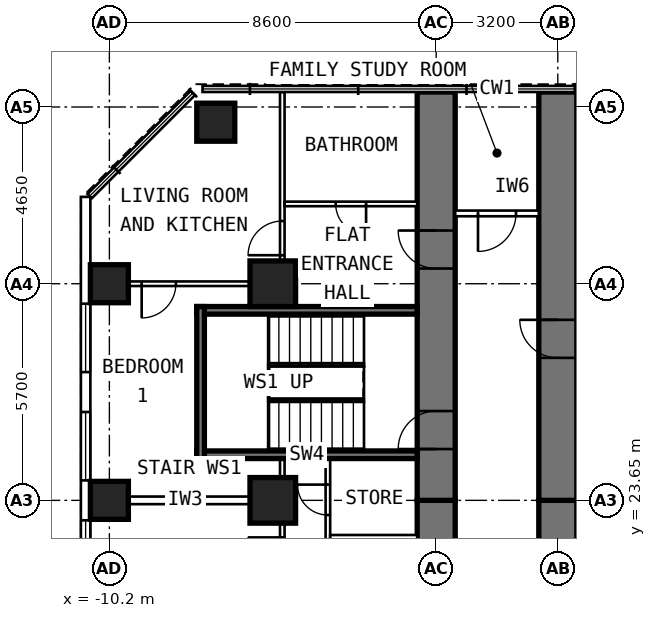
"""IFC4 building model, lengths in metres.
Left out: names, types, materials, properties, quantities, classifications, styles, units other than length and angle.
Written with IfcOpenShell. Run it as: python <this file> out.ifc"""

import sys

from ifc_helpers import new_model, si_unit, direction, frame, frame_2d, origin, origin_2d, place, context, subcontext, project, spatial, rectangle, extrude, element, fill, save


model = new_model("IFC4")
c1 = context("Model", 3, precision=1e-05, world=origin(), true_north=direction((0.0, 1.0)))
c2 = subcontext(c1, "Body", "Model", "MODEL_VIEW")
j1 = project(units=[si_unit("LENGTHUNIT", "METRE"), si_unit("PLANEANGLEUNIT", "RADIAN")], contexts=[c1])
p1 = place(None, origin())
s1 = spatial("IfcSite", under=j1, at=p1, CompositionType="ELEMENT")
p2 = place(p1, origin())
s2 = spatial("IfcBuilding", under=s1, at=p2, CompositionType="ELEMENT")
p3 = place(p2, frame((0.0, 0.0, 68.2)))
s3 = spatial("IfcBuildingStorey", under=s2, at=p3, CompositionType="ELEMENT", Elevation=68.2)
for number, where, z_axis, x_axis in (
    (1, (-10.2, 23.65, 0.0), (0.0, 0.0, 1.0), (0.0, 1.0, 0.0)),
    (2, (-10.2, 29.35, 0.0), (0.0, 0.0, 1.0), (0.0, 1.0, 0.0)),
    (3, (-7.4, 33.6, 0.0), (0.0, 0.0, 1.0), (0.0, 1.0, 0.0)),
):
    element("IfcColumn", number, at=place(p3, frame(where, z_axis=z_axis, x_axis=x_axis)), inside=s3, PredefinedType="COLUMN", context=c2, shape_type="SweptSolid", body=[
        extrude(rectangle(XDim=1.0, YDim=1.0, at=origin_2d()), origin(), (0.0, 0.0, 1.0), 3.6),
    ])
for number, where, z_axis, x_axis in (
    (4, (-5.9, 23.65, 0.0), (0.0, 0.0, 1.0), (0.0, 1.0, 0.0)),
    (5, (-5.9, 29.35, 0.0), (0.0, 0.0, 1.0), (0.0, 1.0, 0.0)),
):
    element("IfcColumn", number, at=place(p3, frame(where, z_axis=z_axis, x_axis=x_axis)), inside=s3, PredefinedType="COLUMN", context=c2, shape_type="SweptSolid", body=[
        extrude(rectangle(XDim=1.2, YDim=1.2, at=origin_2d()), origin(), (0.0, 0.0, 1.0), 3.6),
    ])
p4 = place(p3, frame((-1.6, 17.95, 0.0), z_axis=(0.0, 0.0, 1.0), x_axis=(0.0, 1.0, 0.0)))
e6 = element("IfcWall", 6, at=p4, inside=s3, PredefinedType="SHEAR", context=c2, shape_type="SweptSolid", body=[
    extrude(rectangle(XDim=5.7, YDim=1.0, at=frame_2d((2.85, 0.0))), origin(), (0.0, 0.0, 1.0), 3.6),
])
p5 = place(p3, frame((-1.6, 23.65, 0.0), z_axis=(0.0, 0.0, 1.0), x_axis=(0.0, 1.0, 0.0)))
e7 = element("IfcWall", 7, at=p5, inside=s3, PredefinedType="SHEAR", context=c2, shape_type="SweptSolid", body=[
    extrude(rectangle(XDim=10.745, YDim=1.0, at=frame_2d((5.373, 0.0))), origin(), (0.0, 0.0, 1.0), 3.6),
])
p6 = place(p5, frame((6.1, 0.0, 0.0)))
e8 = element("IfcOpeningElement", 8, at=p6, cuts=e7, PredefinedType="OPENING", context=c2, shape_type="SweptSolid", body=[
    extrude(rectangle(XDim=1.0, YDim=2.1, at=frame_2d((0.5, 1.05))), frame((0.0, 0.512, 0.0), z_axis=(0.0, -1.0, 0.0), x_axis=(1.0, 0.0, 0.0)), (0.0, 0.0, 1.0), 1.024),
])
p7 = place(p5, frame((1.35, 0.0, 0.0)))
e9 = element("IfcOpeningElement", 9, at=p7, cuts=e7, PredefinedType="OPENING", context=c2, shape_type="SweptSolid", body=[
    extrude(rectangle(XDim=1.0, YDim=2.1, at=frame_2d((0.5, 1.05))), frame((0.0, 0.512, 0.0), z_axis=(0.0, -1.0, 0.0), x_axis=(1.0, 0.0, 0.0)), (0.0, 0.0, 1.0), 1.024),
])
p8 = place(p3, frame((1.6, 17.95, 0.0), z_axis=(0.0, 0.0, 1.0), x_axis=(0.0, 1.0, 0.0)))
e10 = element("IfcWall", 10, at=p8, inside=s3, PredefinedType="SHEAR", context=c2, shape_type="SweptSolid", body=[
    extrude(rectangle(XDim=5.7, YDim=1.0, at=frame_2d((2.85, 0.0))), origin(), (0.0, 0.0, 1.0), 3.6),
])
p9 = place(p3, frame((1.6, 23.65, 0.0), z_axis=(0.0, 0.0, 1.0), x_axis=(0.0, 1.0, 0.0)))
e11 = element("IfcWall", 11, at=p9, inside=s3, PredefinedType="SHEAR", context=c2, shape_type="SweptSolid", body=[
    extrude(rectangle(XDim=10.745, YDim=1.0, at=frame_2d((5.373, 0.0))), origin(), (0.0, 0.0, 1.0), 3.6),
])
p10 = place(p9, frame((3.75, 0.0, 0.0)))
e12 = element("IfcOpeningElement", 12, at=p10, cuts=e11, PredefinedType="OPENING", context=c2, shape_type="SweptSolid", body=[
    extrude(rectangle(XDim=1.0, YDim=2.1, at=frame_2d((0.5, 1.05))), frame((0.0, 0.512, 0.0), z_axis=(0.0, -1.0, 0.0), x_axis=(1.0, 0.0, 0.0)), (0.0, 0.0, 1.0), 1.024),
])
p11 = place(p3, frame((-10.825, 6.148, 0.0), z_axis=(0.0, 0.0, 1.0), x_axis=(0.0, 1.0, 0.0)))
e13 = element("IfcWall", 13, at=p11, inside=s3, PredefinedType="SOLIDWALL", context=c2, shape_type="SweptSolid", body=[
    extrude(rectangle(XDim=25.487, YDim=0.25, at=frame_2d((12.744, 0.0))), origin(), (0.0, 0.0, 1.0), 3.35),
])
p12 = place(p11, frame((0.927, 0.0, 0.8)))
e14 = element("IfcOpeningElement", 14, at=p12, cuts=e13, PredefinedType="OPENING", context=c2, shape_type="SweptSolid", body=[
    extrude(rectangle(XDim=1.8, YDim=1.8, at=frame_2d((0.9, 0.9))), frame((0.0, 0.137, 0.0), z_axis=(0.0, -1.0, 0.0), x_axis=(1.0, 0.0, 0.0)), (0.0, 0.0, 1.0), 0.274),
])
p13 = place(p11, frame((3.777, 0.0, 0.8)))
e15 = element("IfcOpeningElement", 15, at=p13, cuts=e13, PredefinedType="OPENING", context=c2, shape_type="SweptSolid", body=[
    extrude(rectangle(XDim=1.8, YDim=1.8, at=frame_2d((0.9, 0.9))), frame((0.0, 0.137, 0.0), z_axis=(0.0, -1.0, 0.0), x_axis=(1.0, 0.0, 0.0)), (0.0, 0.0, 1.0), 0.274),
])
p14 = place(p11, frame((6.627, 0.0, 0.8)))
e16 = element("IfcOpeningElement", 16, at=p14, cuts=e13, PredefinedType="OPENING", context=c2, shape_type="SweptSolid", body=[
    extrude(rectangle(XDim=1.8, YDim=1.8, at=frame_2d((0.9, 0.9))), frame((0.0, 0.137, 0.0), z_axis=(0.0, -1.0, 0.0), x_axis=(1.0, 0.0, 0.0)), (0.0, 0.0, 1.0), 0.274),
])
p15 = place(p11, frame((9.477, 0.0, 0.8)))
e17 = element("IfcOpeningElement", 17, at=p15, cuts=e13, PredefinedType="OPENING", context=c2, shape_type="SweptSolid", body=[
    extrude(rectangle(XDim=1.8, YDim=1.8, at=frame_2d((0.9, 0.9))), frame((0.0, 0.137, 0.0), z_axis=(0.0, -1.0, 0.0), x_axis=(1.0, 0.0, 0.0)), (0.0, 0.0, 1.0), 0.274),
])
p16 = place(p11, frame((12.327, 0.0, 0.8)))
e18 = element("IfcOpeningElement", 18, at=p16, cuts=e13, PredefinedType="OPENING", context=c2, shape_type="SweptSolid", body=[
    extrude(rectangle(XDim=1.8, YDim=1.8, at=frame_2d((0.9, 0.9))), frame((0.0, 0.137, 0.0), z_axis=(0.0, -1.0, 0.0), x_axis=(1.0, 0.0, 0.0)), (0.0, 0.0, 1.0), 0.274),
])
p17 = place(p11, frame((15.177, 0.0, 0.8)))
e19 = element("IfcOpeningElement", 19, at=p17, cuts=e13, PredefinedType="OPENING", context=c2, shape_type="SweptSolid", body=[
    extrude(rectangle(XDim=1.8, YDim=1.8, at=frame_2d((0.9, 0.9))), frame((0.0, 0.137, 0.0), z_axis=(0.0, -1.0, 0.0), x_axis=(1.0, 0.0, 0.0)), (0.0, 0.0, 1.0), 0.274),
])
p18 = place(p11, frame((18.027, 0.0, 0.8)))
e20 = element("IfcOpeningElement", 20, at=p18, cuts=e13, PredefinedType="OPENING", context=c2, shape_type="SweptSolid", body=[
    extrude(rectangle(XDim=1.8, YDim=1.8, at=frame_2d((0.9, 0.9))), frame((0.0, 0.137, 0.0), z_axis=(0.0, -1.0, 0.0), x_axis=(1.0, 0.0, 0.0)), (0.0, 0.0, 1.0), 0.274),
])
p19 = place(p11, frame((20.877, 0.0, 0.8)))
e21 = element("IfcOpeningElement", 21, at=p19, cuts=e13, PredefinedType="OPENING", context=c2, shape_type="SweptSolid", body=[
    extrude(rectangle(XDim=1.8, YDim=1.8, at=frame_2d((0.9, 0.9))), frame((0.0, 0.137, 0.0), z_axis=(0.0, -1.0, 0.0), x_axis=(1.0, 0.0, 0.0)), (0.0, 0.0, 1.0), 0.274),
])
p20 = place(p3, frame((-4.45, 10.1, 0.0), z_axis=(0.0, 0.0, 1.0), x_axis=(0.0, 1.0, 0.0)))
e22 = element("IfcWall", 22, at=p20, inside=s3, PredefinedType="PARTITIONING", context=c2, shape_type="SweptSolid", body=[
    extrude(rectangle(XDim=14.65, YDim=0.12, at=frame_2d((7.325, 0.0))), origin(), (0.0, 0.0, 1.0), 3.35),
])
p21 = place(p20, frame((0.375, 0.0, 0.0)))
e23 = element("IfcOpeningElement", 23, at=p21, cuts=e22, PredefinedType="OPENING", context=c2, shape_type="SweptSolid", body=[
    extrude(rectangle(XDim=0.9, YDim=2.1, at=frame_2d((0.45, 1.05))), frame((0.0, 0.072, 0.0), z_axis=(0.0, -1.0, 0.0), x_axis=(1.0, 0.0, 0.0)), (0.0, 0.0, 1.0), 0.144),
])
p22 = place(p20, frame((2.275, 0.0, 0.0)))
e24 = element("IfcOpeningElement", 24, at=p22, cuts=e22, PredefinedType="OPENING", context=c2, shape_type="SweptSolid", body=[
    extrude(rectangle(XDim=0.8, YDim=2.1, at=frame_2d((0.4, 1.05))), frame((0.0, 0.072, 0.0), z_axis=(0.0, -1.0, 0.0), x_axis=(1.0, 0.0, 0.0)), (0.0, 0.0, 1.0), 0.144),
])
p23 = place(p20, frame((4.125, 0.0, 0.0)))
e25 = element("IfcOpeningElement", 25, at=p23, cuts=e22, PredefinedType="OPENING", context=c2, shape_type="SweptSolid", body=[
    extrude(rectangle(XDim=0.8, YDim=2.1, at=frame_2d((0.4, 1.05))), frame((0.0, 0.072, 0.0), z_axis=(0.0, -1.0, 0.0), x_axis=(1.0, 0.0, 0.0)), (0.0, 0.0, 1.0), 0.144),
])
p24 = place(p20, frame((6.1, 0.0, 0.0)))
e26 = element("IfcOpeningElement", 26, at=p24, cuts=e22, PredefinedType="OPENING", context=c2, shape_type="SweptSolid", body=[
    extrude(rectangle(XDim=0.9, YDim=2.1, at=frame_2d((0.45, 1.05))), frame((0.0, 0.072, 0.0), z_axis=(0.0, -1.0, 0.0), x_axis=(1.0, 0.0, 0.0)), (0.0, 0.0, 1.0), 0.144),
])
p25 = place(p20, frame((8.729, 0.0, 0.0)))
e27 = element("IfcOpeningElement", 27, at=p25, cuts=e22, PredefinedType="OPENING", context=c2, shape_type="SweptSolid", body=[
    extrude(rectangle(XDim=0.8, YDim=2.1, at=frame_2d((0.4, 1.05))), frame((0.0, 0.072, 0.0), z_axis=(0.0, -1.0, 0.0), x_axis=(1.0, 0.0, 0.0)), (0.0, 0.0, 1.0), 0.144),
])
p26 = place(p20, frame((11.143, 0.0, 0.0)))
e28 = element("IfcOpeningElement", 28, at=p26, cuts=e22, PredefinedType="OPENING", context=c2, shape_type="SweptSolid", body=[
    extrude(rectangle(XDim=0.9, YDim=2.1, at=frame_2d((0.45, 1.05))), frame((0.0, 0.072, 0.0), z_axis=(0.0, -1.0, 0.0), x_axis=(1.0, 0.0, 0.0)), (0.0, 0.0, 1.0), 0.144),
])
p27 = place(p20, frame((13.164, 0.0, 0.0)))
e29 = element("IfcOpeningElement", 29, at=p27, cuts=e22, PredefinedType="OPENING", context=c2, shape_type="SweptSolid", body=[
    extrude(rectangle(XDim=0.8, YDim=2.1, at=frame_2d((0.4, 1.05))), frame((0.0, 0.072, 0.0), z_axis=(0.0, -1.0, 0.0), x_axis=(1.0, 0.0, 0.0)), (0.0, 0.0, 1.0), 0.144),
])
p28 = place(p3, frame((-5.65, 9.6, 0.0), z_axis=(0.0, 0.0, 1.0), x_axis=(0.0, 1.0, 0.0)))
e30 = element("IfcWall", 30, at=p28, inside=s3, PredefinedType="PARTITIONING", context=c2, shape_type="SweptSolid", body=[
    extrude(rectangle(XDim=15.15, YDim=0.12, at=frame_2d((7.575, 0.0))), origin(), (0.0, 0.0, 1.0), 3.35),
])
p29 = place(p28, frame((1.0, 0.0, 0.0)))
e31 = element("IfcOpeningElement", 31, at=p29, cuts=e30, PredefinedType="OPENING", context=c2, shape_type="SweptSolid", body=[
    extrude(rectangle(XDim=0.9, YDim=2.1, at=frame_2d((0.45, 1.05))), frame((0.0, 0.072, 0.0), z_axis=(0.0, -1.0, 0.0), x_axis=(1.0, 0.0, 0.0)), (0.0, 0.0, 1.0), 0.144),
])
p30 = place(p28, frame((3.625, 0.0, 0.0)))
e32 = element("IfcOpeningElement", 32, at=p30, cuts=e30, PredefinedType="OPENING", context=c2, shape_type="SweptSolid", body=[
    extrude(rectangle(XDim=0.9, YDim=2.1, at=frame_2d((0.45, 1.05))), frame((0.0, 0.072, 0.0), z_axis=(0.0, -1.0, 0.0), x_axis=(1.0, 0.0, 0.0)), (0.0, 0.0, 1.0), 0.144),
])
p31 = place(p28, frame((6.475, 0.0, 0.0)))
e33 = element("IfcOpeningElement", 33, at=p31, cuts=e30, PredefinedType="OPENING", context=c2, shape_type="SweptSolid", body=[
    extrude(rectangle(XDim=0.9, YDim=2.1, at=frame_2d((0.45, 1.05))), frame((0.0, 0.072, 0.0), z_axis=(0.0, -1.0, 0.0), x_axis=(1.0, 0.0, 0.0)), (0.0, 0.0, 1.0), 0.144),
])
p32 = place(p28, frame((9.325, 0.0, 0.0)))
e34 = element("IfcOpeningElement", 34, at=p32, cuts=e30, PredefinedType="OPENING", context=c2, shape_type="SweptSolid", body=[
    extrude(rectangle(XDim=0.9, YDim=2.1, at=frame_2d((0.45, 1.05))), frame((0.0, 0.072, 0.0), z_axis=(0.0, -1.0, 0.0), x_axis=(1.0, 0.0, 0.0)), (0.0, 0.0, 1.0), 0.144),
])
p33 = place(p28, frame((12.175, 0.0, 0.0)))
e35 = element("IfcOpeningElement", 35, at=p33, cuts=e30, PredefinedType="OPENING", context=c2, shape_type="SweptSolid", body=[
    extrude(rectangle(XDim=0.9, YDim=2.1, at=frame_2d((0.45, 1.05))), frame((0.0, 0.072, 0.0), z_axis=(0.0, -1.0, 0.0), x_axis=(1.0, 0.0, 0.0)), (0.0, 0.0, 1.0), 0.144),
])
p34 = place(p3, frame((-2.1, 22.678, 0.0), z_axis=(0.0, 0.0, 1.0), x_axis=(-1.0, 0.0, 0.0)))
e36 = element("IfcWall", 36, at=p34, inside=s3, PredefinedType="PARTITIONING", context=c2, shape_type="SweptSolid", body=[
    extrude(rectangle(XDim=2.29, YDim=0.12, at=frame_2d((1.145, 0.0))), origin(), (0.0, 0.0, 1.0), 3.35),
])
p35 = place(p3, frame((-5.71, 23.65, 0.0), z_axis=(0.0, 0.0, 1.0), x_axis=(-1.0, 0.0, 0.0)))
e37 = element("IfcWall", 37, at=p35, inside=s3, PredefinedType="PARTITIONING", context=c2, shape_type="SweptSolid", body=[
    extrude(rectangle(XDim=4.99, YDim=0.2, at=frame_2d((2.495, 0.0))), origin(), (0.0, 0.0, 1.0), 2.45),
])
p36 = place(p3, frame((-5.71, 29.35, 0.0), z_axis=(0.0, 0.0, 1.0), x_axis=(-1.0, 0.0, 0.0)))
e38 = element("IfcWall", 38, at=p36, inside=s3, PredefinedType="PARTITIONING", context=c2, shape_type="SweptSolid", body=[
    extrude(rectangle(XDim=4.99, YDim=0.12, at=frame_2d((2.495, 0.0))), origin(), (0.0, 0.0, 1.0), 2.45),
])
p37 = place(p36, frame((2.74, 0.0, 0.0)))
e39 = element("IfcOpeningElement", 39, at=p37, cuts=e38, PredefinedType="OPENING", context=c2, shape_type="SweptSolid", body=[
    extrude(rectangle(XDim=0.9, YDim=2.1, at=frame_2d((0.45, 1.05))), frame((0.0, 0.072, 0.0), z_axis=(0.0, -1.0, 0.0), x_axis=(1.0, 0.0, 0.0)), (0.0, 0.0, 1.0), 0.144),
])
p38 = place(p3, frame((-5.65, 28.95, 0.0), z_axis=(0.0, 0.0, 1.0), x_axis=(0.0, 1.0, 0.0)))
e40 = element("IfcWall", 40, at=p38, inside=s3, PredefinedType="PARTITIONING", context=c2, shape_type="SweptSolid", body=[
    extrude(rectangle(XDim=5.445, YDim=0.12, at=frame_2d((2.723, 0.0))), origin(), (0.0, 0.0, 1.0), 3.35),
])
p39 = place(p38, frame((1.15, 0.0, 0.0)))
e41 = element("IfcOpeningElement", 41, at=p39, cuts=e40, PredefinedType="OPENING", context=c2, shape_type="SweptSolid", body=[
    extrude(rectangle(XDim=0.9, YDim=2.1, at=frame_2d((0.45, 1.05))), frame((0.0, 0.072, 0.0), z_axis=(0.0, -1.0, 0.0), x_axis=(1.0, 0.0, 0.0)), (0.0, 0.0, 1.0), 0.144),
])
p40 = place(p3, frame((-2.1, 31.45, 0.0), z_axis=(0.0, 0.0, 1.0), x_axis=(-1.0, 0.0, 0.0)))
e42 = element("IfcWall", 42, at=p40, inside=s3, PredefinedType="PARTITIONING", context=c2, shape_type="SweptSolid", body=[
    extrude(rectangle(XDim=3.49, YDim=0.12, at=frame_2d((1.745, 0.0))), origin(), (0.0, 0.0, 1.0), 3.35),
])
p41 = place(p40, frame((1.345, 0.0, 0.0)))
e43 = element("IfcOpeningElement", 43, at=p41, cuts=e42, PredefinedType="OPENING", context=c2, shape_type="SweptSolid", body=[
    extrude(rectangle(XDim=0.8, YDim=2.1, at=frame_2d((0.4, 1.05))), frame((0.0, 0.072, 0.0), z_axis=(0.0, -1.0, 0.0), x_axis=(1.0, 0.0, 0.0)), (0.0, 0.0, 1.0), 0.144),
])
p42 = place(p3, frame((2.1, 26.5, 0.0), z_axis=(0.0, 0.0, 1.0), x_axis=(1.0, 0.0, 0.0)))
e44 = element("IfcWall", 44, at=p42, inside=s3, PredefinedType="PARTITIONING", context=c2, shape_type="SweptSolid", body=[
    extrude(rectangle(XDim=8.6, YDim=0.2, at=frame_2d((4.3, 0.0))), origin(), (0.0, 0.0, 1.0), 3.35),
])
p43 = place(p3, frame((1.1, 31.2, 0.0), z_axis=(0.0, 0.0, 1.0), x_axis=(-1.0, 0.0, 0.0)))
e45 = element("IfcWall", 45, at=p43, inside=s3, PredefinedType="PARTITIONING", context=c2, shape_type="SweptSolid", body=[
    extrude(rectangle(XDim=2.2, YDim=0.15, at=frame_2d((1.1, 0.0))), origin(), (0.0, 0.0, 1.0), 3.35),
])
p44 = place(p43, frame((0.6, 0.0, 0.0)))
e46 = element("IfcOpeningElement", 46, at=p44, cuts=e45, PredefinedType="OPENING", context=c2, shape_type="SweptSolid", body=[
    extrude(rectangle(XDim=1.0, YDim=2.1, at=frame_2d((0.5, 1.05))), frame((0.0, 0.087, 0.0), z_axis=(0.0, -1.0, 0.0), x_axis=(1.0, 0.0, 0.0)), (0.0, 0.0, 1.0), 0.174),
])
for number, where, z_axis, x_axis in (
    (47, (-2.1, 24.85, 0.0), (0.0, 0.0, 1.0), (-1.0, 0.0, 0.0)),
    (48, (-2.1, 28.65, 0.0), (0.0, 0.0, 1.0), (-1.0, 0.0, 0.0)),
):
    element("IfcWall", number, at=place(p3, frame(where, z_axis=z_axis, x_axis=x_axis)), inside=s3, PredefinedType="SHEAR", context=c2, shape_type="SweptSolid", body=[
        extrude(rectangle(XDim=5.8, YDim=0.2, at=frame_2d((2.9, 0.0))), origin(), (0.0, 0.0, 1.0), 3.33),
    ])
p45 = place(p3, frame((-7.8, 24.75, 0.0), z_axis=(0.0, 0.0, 1.0), x_axis=(0.0, 1.0, 0.0)))
e49 = element("IfcWall", 49, at=p45, inside=s3, PredefinedType="SHEAR", context=c2, shape_type="SweptSolid", body=[
    extrude(rectangle(XDim=4.0, YDim=0.2, at=frame_2d((2.0, 0.0))), origin(), (0.0, 0.0, 1.0), 3.33),
])
p46 = place(p17, origin())
e50 = element("IfcWindow", 50, at=p46, inside=s3, PartitioningType="SINGLE_PANEL", PredefinedType="WINDOW", context=c2, shape_type="SweptSolid", body=[
    extrude(rectangle(XDim=1.8, YDim=1.8, at=frame_2d((0.9, 0.9))), frame((0.0, 0.03, 0.0), z_axis=(0.0, -1.0, 0.0), x_axis=(1.0, 0.0, 0.0)), (0.0, 0.0, 1.0), 0.06),
])
fill(e19, e50)
p47 = place(p18, origin())
e51 = element("IfcWindow", 51, at=p47, inside=s3, PartitioningType="SINGLE_PANEL", PredefinedType="WINDOW", context=c2, shape_type="SweptSolid", body=[
    extrude(rectangle(XDim=1.8, YDim=1.8, at=frame_2d((0.9, 0.9))), frame((0.0, 0.03, 0.0), z_axis=(0.0, -1.0, 0.0), x_axis=(1.0, 0.0, 0.0)), (0.0, 0.0, 1.0), 0.06),
])
fill(e20, e51)
p48 = place(p19, origin())
e52 = element("IfcWindow", 52, at=p48, inside=s3, PartitioningType="SINGLE_PANEL", PredefinedType="WINDOW", context=c2, shape_type="SweptSolid", body=[
    extrude(rectangle(XDim=1.8, YDim=1.8, at=frame_2d((0.9, 0.9))), frame((0.0, 0.03, 0.0), z_axis=(0.0, -1.0, 0.0), x_axis=(1.0, 0.0, 0.0)), (0.0, 0.0, 1.0), 0.06),
])
fill(e21, e52)
p49 = place(p33, origin())
e53 = element("IfcDoor", 53, at=p49, inside=s3, OperationType="SINGLE_SWING_RIGHT", PredefinedType="DOOR", context=c2, shape_type="SweptSolid", body=[
    extrude(rectangle(XDim=0.9, YDim=2.1, at=frame_2d((0.45, 1.05))), frame((0.0, 0.025, 0.0), z_axis=(0.0, -1.0, 0.0), x_axis=(1.0, 0.0, 0.0)), (0.0, 0.0, 1.0), 0.05),
])
fill(e35, e53)
p50 = place(p27, origin())
e54 = element("IfcDoor", 54, at=p50, inside=s3, OperationType="SINGLE_SWING_RIGHT", PredefinedType="DOOR", context=c2, shape_type="SweptSolid", body=[
    extrude(rectangle(XDim=0.8, YDim=2.1, at=frame_2d((0.4, 1.05))), frame((0.0, 0.025, 0.0), z_axis=(0.0, -1.0, 0.0), x_axis=(1.0, 0.0, 0.0)), (0.0, 0.0, 1.0), 0.05),
])
fill(e29, e54)
p51 = place(p37, origin())
e55 = element("IfcDoor", 55, at=p51, inside=s3, OperationType="SINGLE_SWING_RIGHT", PredefinedType="DOOR", context=c2, shape_type="SweptSolid", body=[
    extrude(rectangle(XDim=0.9, YDim=2.1, at=frame_2d((0.45, 1.05))), frame((0.0, 0.025, 0.0), z_axis=(0.0, -1.0, 0.0), x_axis=(1.0, 0.0, 0.0)), (0.0, 0.0, 1.0), 0.05),
])
fill(e39, e55)
p52 = place(p39, origin())
e56 = element("IfcDoor", 56, at=p52, inside=s3, OperationType="SINGLE_SWING_LEFT", PredefinedType="DOOR", context=c2, shape_type="SweptSolid", body=[
    extrude(rectangle(XDim=0.9, YDim=2.1, at=frame_2d((0.45, 1.05))), frame((0.0, 0.025, 0.0), z_axis=(0.0, -1.0, 0.0), x_axis=(1.0, 0.0, 0.0)), (0.0, 0.0, 1.0), 0.05),
])
fill(e41, e56)
p53 = place(p41, origin())
e57 = element("IfcDoor", 57, at=p53, inside=s3, OperationType="SINGLE_SWING_LEFT", PredefinedType="DOOR", context=c2, shape_type="SweptSolid", body=[
    extrude(rectangle(XDim=0.8, YDim=2.1, at=frame_2d((0.4, 1.05))), frame((0.0, 0.025, 0.0), z_axis=(0.0, -1.0, 0.0), x_axis=(1.0, 0.0, 0.0)), (0.0, 0.0, 1.0), 0.05),
])
fill(e43, e57)
p54 = place(p6, origin())
e58 = element("IfcDoor", 58, at=p54, inside=s3, OperationType="SINGLE_SWING_RIGHT", PredefinedType="DOOR", context=c2, shape_type="SweptSolid", body=[
    extrude(rectangle(XDim=1.0, YDim=2.1, at=frame_2d((0.5, 1.05))), frame((0.0, 0.25, 0.0), z_axis=(0.0, -1.0, 0.0), x_axis=(1.0, 0.0, 0.0)), (0.0, 0.0, 1.0), 0.5),
])
fill(e8, e58)
p55 = place(p10, origin())
e59 = element("IfcDoor", 59, at=p55, inside=s3, OperationType="SINGLE_SWING_RIGHT", PredefinedType="DOOR", context=c2, shape_type="SweptSolid", body=[
    extrude(rectangle(XDim=1.0, YDim=2.1, at=frame_2d((0.5, 1.05))), frame((0.0, 0.25, 0.0), z_axis=(0.0, -1.0, 0.0), x_axis=(1.0, 0.0, 0.0)), (0.0, 0.0, 1.0), 0.5),
])
fill(e12, e59)
p56 = place(p44, origin())
e60 = element("IfcDoor", 60, at=p56, inside=s3, OperationType="SINGLE_SWING_RIGHT", PredefinedType="DOOR", context=c2, shape_type="SweptSolid", body=[
    extrude(rectangle(XDim=1.0, YDim=2.1, at=frame_2d((0.5, 1.05))), frame((0.0, 0.025, 0.0), z_axis=(0.0, -1.0, 0.0), x_axis=(1.0, 0.0, 0.0)), (0.0, 0.0, 1.0), 0.05),
])
fill(e46, e60)
p57 = place(p7, origin())
e61 = element("IfcDoor", 61, at=p57, inside=s3, OperationType="SINGLE_SWING_LEFT", PredefinedType="DOOR", context=c2, shape_type="SweptSolid", body=[
    extrude(rectangle(XDim=1.0, YDim=2.1, at=frame_2d((0.5, 1.05))), frame((0.0, 0.25, 0.0), z_axis=(0.0, -1.0, 0.0), x_axis=(1.0, 0.0, 0.0)), (0.0, 0.0, 1.0), 0.5),
])
fill(e9, e61)
save(model, sys.argv[1])
